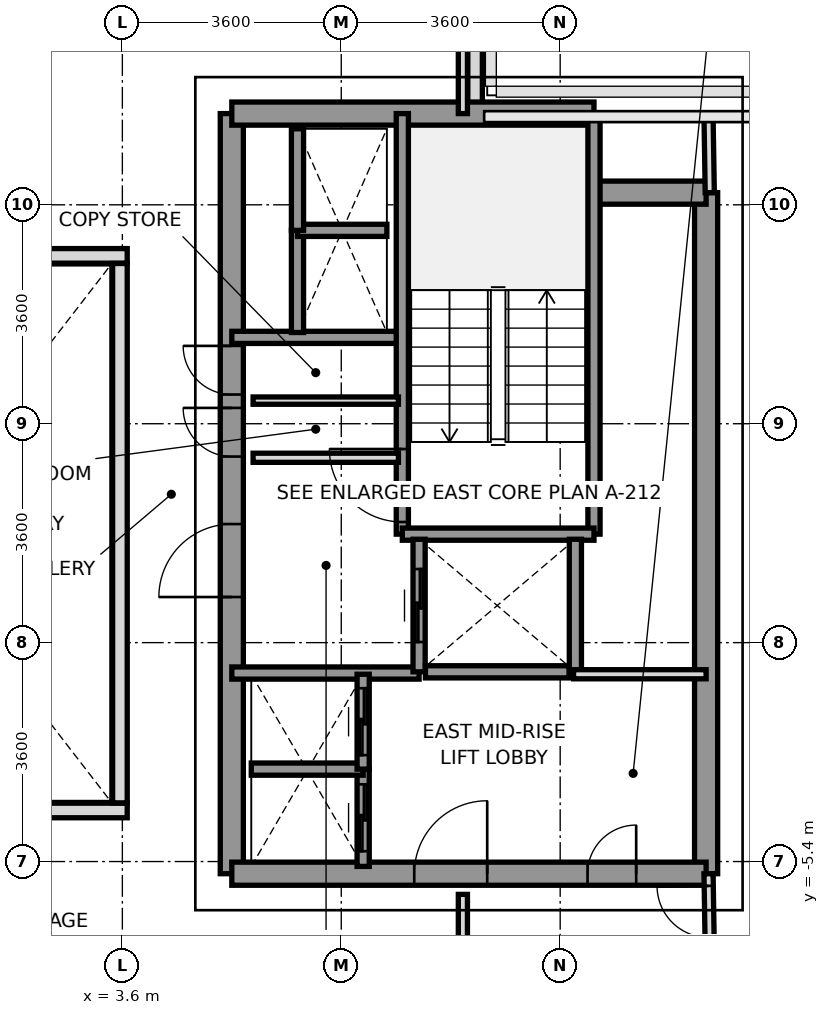
"""IFC4 building model, lengths in metres.
Left out: names, types, materials, properties, quantities, classifications, styles, units other than length and angle.
Written with IfcOpenShell. Run it as: python <this file> out.ifc"""

import sys

from ifc_helpers import new_model, si_unit, direction, frame, frame_2d, origin, place, context, subcontext, project, spatial, rectangle, extrude, source, transform, mapped, element, fill, save


model = new_model("IFC4")
c1 = context("Model", 3, precision=1e-05, world=origin(), true_north=direction((0.0, 1.0)))
c2 = subcontext(c1, "Body", "Model", "MODEL_VIEW")
j1 = project(units=[si_unit("LENGTHUNIT", "METRE"), si_unit("PLANEANGLEUNIT", "RADIAN")], contexts=[c1])
p1 = place(None, origin())
s1 = spatial("IfcSite", under=j1, at=p1, CompositionType="ELEMENT")
p2 = place(p1, origin())
s2 = spatial("IfcBuilding", under=s1, at=p2, CompositionType="ELEMENT")
p3 = place(p2, frame((0.0, 0.0, 163.8)))
s3 = spatial("IfcBuildingStorey", under=s2, at=p3, CompositionType="ELEMENT", Elevation=163.8)
p4 = place(p3, frame((9.4, 8.547, 0.0), z_axis=(0.0, 0.0, 1.0), x_axis=(0.0, -1.0, 0.0)))
e1 = element("IfcWall", 1, at=p4, inside=s3, PredefinedType="PARAPET", context=c2, shape_type="SweptSolid", body=[
    extrude(rectangle(XDim=1.594, YDim=0.24, at=frame_2d((0.797, 0.0))), origin(), (0.0, 0.0, 1.0), 1.15),
])
p5 = place(p3, frame((13.2, -5.6, 0.0), z_axis=(0.0, 0.0, 1.0), x_axis=(0.0, 1.0, 0.0)))
e2 = element("IfcWall", 2, at=p5, inside=s3, PredefinedType="SHEAR", context=c2, shape_type="SweptSolid", body=[
    extrude(rectangle(XDim=11.2, YDim=0.38, at=frame_2d((5.6, 0.0))), origin(), (0.0, 0.0, 1.0), 3.2),
])
p6 = place(p3, frame((5.4, -5.6, 0.0), z_axis=(0.0, 0.0, 1.0), x_axis=(0.0, 1.0, 0.0)))
e3 = element("IfcWall", 3, at=p6, inside=s3, PredefinedType="SHEAR", context=c2, shape_type="SweptSolid", body=[
    extrude(rectangle(XDim=12.5, YDim=0.38, at=frame_2d((6.25, 0.0))), origin(), (0.0, 0.0, 1.0), 3.2),
])
p7 = place(p6, frame((4.55, 0.0, 0.0)))
e4 = element("IfcOpeningElement", 4, at=p7, cuts=e3, PredefinedType="OPENING", context=c2, shape_type="SweptSolid", body=[
    extrude(rectangle(XDim=1.2, YDim=2.2, at=frame_2d((0.6, 1.1))), frame((0.0, 0.2, 0.0), z_axis=(0.0, -1.0, 0.0), x_axis=(1.0, 0.0, 0.0)), (0.0, 0.0, 1.0), 0.4),
])
p8 = place(p6, frame((6.86, 0.0, 0.0)))
e5 = element("IfcOpeningElement", 5, at=p8, cuts=e3, PredefinedType="OPENING", context=c2, shape_type="SweptSolid", body=[
    extrude(rectangle(XDim=0.8, YDim=2.1, at=frame_2d((0.4, 1.05))), frame((0.0, 0.2, 0.0), z_axis=(0.0, -1.0, 0.0), x_axis=(1.0, 0.0, 0.0)), (0.0, 0.0, 1.0), 0.4),
])
p9 = place(p6, frame((7.88, 0.0, 0.0)))
e6 = element("IfcOpeningElement", 6, at=p9, cuts=e3, PredefinedType="OPENING", context=c2, shape_type="SweptSolid", body=[
    extrude(rectangle(XDim=0.8, YDim=2.1, at=frame_2d((0.4, 1.05))), frame((0.0, 0.2, 0.0), z_axis=(0.0, -1.0, 0.0), x_axis=(1.0, 0.0, 0.0)), (0.0, 0.0, 1.0), 0.4),
])
p10 = place(p3, frame((5.4, 6.9, 0.0), z_axis=(0.0, 0.0, 1.0), x_axis=(1.0, 0.0, 0.0)))
e7 = element("IfcWall", 7, at=p10, inside=s3, PredefinedType="SHEAR", context=c2, shape_type="SweptSolid", body=[
    extrude(rectangle(XDim=5.956, YDim=0.38, at=frame_2d((2.978, 0.0))), origin(), (0.0, 0.0, 1.0), 3.2),
])
p11 = place(p3, frame((11.356, 5.6, 0.0), z_axis=(0.0, 0.0, 1.0), x_axis=(1.0, 0.0, 0.0)))
e8 = element("IfcWall", 8, at=p11, inside=s3, PredefinedType="SHEAR", context=c2, shape_type="SweptSolid", body=[
    extrude(rectangle(XDim=1.844, YDim=0.38, at=frame_2d((0.922, 0.0))), origin(), (0.0, 0.0, 1.0), 3.2),
])
p12 = place(p3, frame((5.4, -5.6, 0.0), z_axis=(0.0, 0.0, 1.0), x_axis=(1.0, 0.0, 0.0)))
e9 = element("IfcWall", 9, at=p12, inside=s3, PredefinedType="SHEAR", context=c2, shape_type="SweptSolid", body=[
    extrude(rectangle(XDim=7.8, YDim=0.38, at=frame_2d((3.9, 0.0))), origin(), (0.0, 0.0, 1.0), 3.2),
])
p13 = place(p12, frame((3.0, 0.0, 0.0)))
e10 = element("IfcOpeningElement", 10, at=p13, cuts=e9, PredefinedType="OPENING", context=c2, shape_type="SweptSolid", body=[
    extrude(rectangle(XDim=1.2, YDim=2.2, at=frame_2d((0.6, 1.1))), frame((0.0, 0.2, 0.0), z_axis=(0.0, -1.0, 0.0), x_axis=(1.0, 0.0, 0.0)), (0.0, 0.0, 1.0), 0.4),
])
p14 = place(p12, frame((5.85, 0.0, 0.0)))
e11 = element("IfcOpeningElement", 11, at=p14, cuts=e9, PredefinedType="OPENING", context=c2, shape_type="SweptSolid", body=[
    extrude(rectangle(XDim=0.8, YDim=2.1, at=frame_2d((0.4, 1.05))), frame((0.0, 0.2, 0.0), z_axis=(0.0, -1.0, 0.0), x_axis=(1.0, 0.0, 0.0)), (0.0, 0.0, 1.0), 0.4),
])
p15 = place(p3, frame((5.4, 3.22, 0.0), z_axis=(0.0, 0.0, 1.0), x_axis=(1.0, 0.0, 0.0)))
e12 = element("IfcWall", 12, at=p15, inside=s3, PredefinedType="SOLIDWALL", context=c2, shape_type="SweptSolid", body=[
    extrude(rectangle(XDim=2.78, YDim=0.2, at=frame_2d((1.39, 0.0))), origin(), (0.0, 0.0, 1.0), 3.2),
])
p16 = place(p3, frame((5.4, -2.3, 0.0), z_axis=(0.0, 0.0, 1.0), x_axis=(1.0, 0.0, 0.0)))
e13 = element("IfcWall", 13, at=p16, inside=s3, PredefinedType="SOLIDWALL", context=c2, shape_type="SweptSolid", body=[
    extrude(rectangle(XDim=3.08, YDim=0.2, at=frame_2d((1.54, 0.0))), origin(), (0.0, 0.0, 1.0), 3.2),
])
p17 = place(p3, frame((8.204, -0.016, 0.0), z_axis=(0.0, 0.0, 1.0), x_axis=(0.0, 1.0, 0.0)))
e14 = element("IfcWall", 14, at=p17, inside=s3, PredefinedType="SOLIDWALL", context=c2, shape_type="SweptSolid", body=[
    extrude(rectangle(XDim=6.916, YDim=0.2, at=frame_2d((3.458, 0.0))), origin(), (0.0, 0.0, 1.0), 3.2),
])
p18 = place(p17, frame((0.2, 0.0, 0.0)))
e15 = element("IfcOpeningElement", 15, at=p18, cuts=e14, PredefinedType="OPENING", context=c2, shape_type="SweptSolid", body=[
    extrude(rectangle(XDim=1.2, YDim=2.2, at=frame_2d((0.6, 1.1))), frame((0.0, 0.11, 0.0), z_axis=(0.0, -1.0, 0.0), x_axis=(1.0, 0.0, 0.0)), (0.0, 0.0, 1.0), 0.22),
])
p19 = place(p3, frame((11.356, -0.016, 0.0), z_axis=(0.0, 0.0, 1.0), x_axis=(0.0, 1.0, 0.0)))
e16 = element("IfcWall", 16, at=p19, inside=s3, PredefinedType="SOLIDWALL", context=c2, shape_type="SweptSolid", body=[
    extrude(rectangle(XDim=6.916, YDim=0.2, at=frame_2d((3.458, 0.0))), origin(), (0.0, 0.0, 1.0), 3.2),
])
p20 = place(p3, frame((8.204, -0.016, 0.0), z_axis=(0.0, 0.0, 1.0), x_axis=(1.0, 0.0, 0.0)))
e17 = element("IfcWall", 17, at=p20, inside=s3, PredefinedType="SOLIDWALL", context=c2, shape_type="SweptSolid", body=[
    extrude(rectangle(XDim=3.152, YDim=0.2, at=frame_2d((1.576, 0.0))), origin(), (0.0, 0.0, 1.0), 3.2),
])
p21 = place(p3, frame((8.48, -2.28, 0.0), z_axis=(0.0, 0.0, 1.0), x_axis=(0.0, 1.0, 0.0)))
e18 = element("IfcWall", 18, at=p21, inside=s3, PredefinedType="SOLIDWALL", context=c2, shape_type="SweptSolid", body=[
    extrude(rectangle(XDim=2.18, YDim=0.2, at=frame_2d((1.09, 0.0))), origin(), (0.0, 0.0, 1.0), 3.2),
])
p22 = place(p21, frame((0.49, 0.0, 0.0)))
e19 = element("IfcOpeningElement", 19, at=p22, cuts=e18, PredefinedType="OPENING", context=c2, shape_type="SweptSolid", body=[
    extrude(rectangle(XDim=1.2, YDim=2.2, at=frame_2d((0.6, 1.1))), frame((0.0, 0.11, 0.0), z_axis=(0.0, -1.0, 0.0), x_axis=(1.0, 0.0, 0.0)), (0.0, 0.0, 1.0), 0.22),
])
p23 = place(p3, frame((11.05, -2.28, 0.0), z_axis=(0.0, 0.0, 1.0), x_axis=(0.0, 1.0, 0.0)))
e20 = element("IfcWall", 20, at=p23, inside=s3, PredefinedType="SOLIDWALL", context=c2, shape_type="SweptSolid", body=[
    extrude(rectangle(XDim=2.18, YDim=0.2, at=frame_2d((1.09, 0.0))), origin(), (0.0, 0.0, 1.0), 3.2),
])
p24 = place(p3, frame((8.584, -2.28, 0.0), z_axis=(0.0, 0.0, 1.0), x_axis=(1.0, 0.0, 0.0)))
e21 = element("IfcWall", 21, at=p24, inside=s3, PredefinedType="SOLIDWALL", context=c2, shape_type="SweptSolid", body=[
    extrude(rectangle(XDim=2.362, YDim=0.2, at=frame_2d((1.181, 0.0))), origin(), (0.0, 0.0, 1.0), 3.2),
])
p25 = place(p3, frame((7.56, -5.48, 0.0), z_axis=(0.0, 0.0, 1.0), x_axis=(0.0, 1.0, 0.0)))
e22 = element("IfcWall", 22, at=p25, inside=s3, PredefinedType="SOLIDWALL", context=c2, shape_type="SweptSolid", body=[
    extrude(rectangle(XDim=1.6, YDim=0.2, at=frame_2d((0.8, 0.0))), origin(), (0.0, 0.0, 1.0), 3.2),
])
p26 = place(p25, frame((0.25, 0.0, 0.0)))
e23 = element("IfcOpeningElement", 23, at=p26, cuts=e22, PredefinedType="OPENING", context=c2, shape_type="SweptSolid", body=[
    extrude(rectangle(XDim=1.1, YDim=2.2, at=frame_2d((0.55, 1.1))), frame((0.0, 0.11, 0.0), z_axis=(0.0, -1.0, 0.0), x_axis=(1.0, 0.0, 0.0)), (0.0, 0.0, 1.0), 0.22),
])
p27 = place(p3, frame((5.72, -3.88, 0.0), z_axis=(0.0, 0.0, 1.0), x_axis=(1.0, 0.0, 0.0)))
e24 = element("IfcWall", 24, at=p27, inside=s3, PredefinedType="SOLIDWALL", context=c2, shape_type="SweptSolid", body=[
    extrude(rectangle(XDim=1.84, YDim=0.2, at=frame_2d((0.92, 0.0))), origin(), (0.0, 0.0, 1.0), 3.2),
])
p28 = place(p3, frame((7.56, -3.88, 0.0), z_axis=(0.0, 0.0, 1.0), x_axis=(0.0, 1.0, 0.0)))
e25 = element("IfcWall", 25, at=p28, inside=s3, PredefinedType="SOLIDWALL", context=c2, shape_type="SweptSolid", body=[
    extrude(rectangle(XDim=1.56, YDim=0.2, at=frame_2d((0.78, 0.0))), origin(), (0.0, 0.0, 1.0), 3.2),
])
p29 = place(p28, frame((0.23, 0.0, 0.0)))
e26 = element("IfcOpeningElement", 26, at=p29, cuts=e25, PredefinedType="OPENING", context=c2, shape_type="SweptSolid", body=[
    extrude(rectangle(XDim=1.1, YDim=2.2, at=frame_2d((0.55, 1.1))), frame((0.0, 0.11, 0.0), z_axis=(0.0, -1.0, 0.0), x_axis=(1.0, 0.0, 0.0)), (0.0, 0.0, 1.0), 0.22),
])
p30 = place(p3, frame((6.48, 3.3, 0.0), z_axis=(0.0, 0.0, 1.0), x_axis=(0.0, 1.0, 0.0)))
e27 = element("IfcWall", 27, at=p30, inside=s3, PredefinedType="SOLIDWALL", context=c2, shape_type="SweptSolid", body=[
    extrude(rectangle(XDim=1.68, YDim=0.2, at=frame_2d((0.84, 0.0))), origin(), (0.0, 0.0, 1.0), 3.2),
])
p31 = place(p3, frame((6.48, 4.98, 0.0), z_axis=(0.0, 0.0, 1.0), x_axis=(1.0, 0.0, 0.0)))
e28 = element("IfcWall", 28, at=p31, inside=s3, PredefinedType="SOLIDWALL", context=c2, shape_type="SweptSolid", body=[
    extrude(rectangle(XDim=1.47, YDim=0.2, at=frame_2d((0.735, 0.0))), origin(), (0.0, 0.0, 1.0), 3.2),
])
p32 = place(p3, frame((6.48, 4.98, 0.0), z_axis=(0.0, 0.0, 1.0), x_axis=(0.0, 1.0, 0.0)))
e29 = element("IfcWall", 29, at=p32, inside=s3, PredefinedType="SOLIDWALL", context=c2, shape_type="SweptSolid", body=[
    extrude(rectangle(XDim=1.67, YDim=0.2, at=frame_2d((0.835, 0.0))), origin(), (0.0, 0.0, 1.0), 3.2),
])
p33 = place(p3, frame((5.75, 1.24, 0.0), z_axis=(0.0, 0.0, 1.0), x_axis=(1.0, 0.0, 0.0)))
e30 = element("IfcWall", 30, at=p33, inside=s3, PredefinedType="PARTITIONING", context=c2, shape_type="SweptSolid", body=[
    extrude(rectangle(XDim=2.39, YDim=0.15, at=frame_2d((1.195, 0.0))), origin(), (0.0, 0.0, 1.0), 2.3),
])
p34 = place(p3, frame((5.75, 2.18, 0.0), z_axis=(0.0, 0.0, 1.0), x_axis=(1.0, 0.0, 0.0)))
e31 = element("IfcWall", 31, at=p34, inside=s3, PredefinedType="PARTITIONING", context=c2, shape_type="SweptSolid", body=[
    extrude(rectangle(XDim=2.39, YDim=0.12, at=frame_2d((1.195, 0.0))), origin(), (0.0, 0.0, 1.0), 2.3),
])
p35 = place(p3, frame((11.02, -2.32, 0.0), z_axis=(0.0, 0.0, 1.0), x_axis=(1.0, 0.0, 0.0)))
e32 = element("IfcWall", 32, at=p35, inside=s3, PredefinedType="PARTITIONING", context=c2, shape_type="SweptSolid", body=[
    extrude(rectangle(XDim=2.18, YDim=0.15, at=frame_2d((1.09, 0.0))), origin(), (0.0, 0.0, 1.0), 3.2),
])
p36 = place(p3, frame((9.2, 6.9, 0.0), z_axis=(0.0, 0.0, 1.0), x_axis=(0.0, 1.0, 0.0)))
e33 = element("IfcWall", 33, at=p36, inside=s3, PredefinedType="PARTITIONING", context=c2, shape_type="SweptSolid", body=[
    extrude(rectangle(XDim=8.78, YDim=0.15, at=frame_2d((4.39, 0.0))), origin(), (0.0, 0.0, 1.0), 2.75),
])
p37 = place(p3, frame((9.2, -15.68, 0.0), z_axis=(0.0, 0.0, 1.0), x_axis=(0.0, 1.0, 0.0)))
e34 = element("IfcWall", 34, at=p37, inside=s3, PredefinedType="PARTITIONING", context=c2, shape_type="SweptSolid", body=[
    extrude(rectangle(XDim=9.74, YDim=0.15, at=frame_2d((4.87, 0.0))), origin(), (0.0, 0.0, 1.0), 2.75),
])
p38 = place(p3, frame((13.26, 5.6, 0.0), z_axis=(0.0, 0.0, 1.0), x_axis=(-0.016013571389, 0.999871774545, 0.0)))
e35 = element("IfcWall", 35, at=p38, inside=s3, PredefinedType="PARTITIONING", context=c2, shape_type="SweptSolid", body=[
    extrude(rectangle(XDim=1.25, YDim=0.15, at=frame_2d((0.625, 0.0))), origin(), (0.0, 0.0, 1.0), 3.2),
])
p39 = place(p3, frame((13.26, -6.85, 0.0), z_axis=(0.0, 0.0, 1.0), x_axis=(-0.016013571389, 0.999871774545, 0.0)))
e36 = element("IfcWall", 36, at=p39, inside=s3, PredefinedType="PARTITIONING", context=c2, shape_type="SweptSolid", body=[
    extrude(rectangle(XDim=1.25, YDim=0.15, at=frame_2d((0.625, 0.0))), origin(), (0.0, 0.0, 1.0), 3.2),
])
p40 = place(p39, frame((0.2, 0.0, 0.0)))
e37 = element("IfcOpeningElement", 37, at=p40, cuts=e36, PredefinedType="OPENING", context=c2, shape_type="SweptSolid", body=[
    extrude(rectangle(XDim=0.85, YDim=2.1, at=frame_2d((0.425, 1.05))), frame((0.0, 0.085, 0.0), z_axis=(0.0, -1.0, 0.0), x_axis=(1.0, 0.0, 0.0)), (0.0, 0.0, 1.0), 0.17),
])
for number, where, z_axis, x_axis in (
    (38, (-3.68, -4.56, 0.0), (0.0, 0.0, 1.0), (1.0, 0.0, 0.0)),
    (39, (-3.68, 4.56, 0.0), (0.0, 0.0, 1.0), (1.0, 0.0, 0.0)),
):
    element("IfcWall", number, at=place(p3, frame(where, z_axis=z_axis, x_axis=x_axis)), inside=s3, PredefinedType="PARAPET", context=c2, shape_type="SweptSolid", body=[
        extrude(rectangle(XDim=7.36, YDim=0.24, at=frame_2d((3.68, 0.0))), origin(), (0.0, 0.0, 1.0), 1.15),
    ])
p41 = place(p3, frame((3.56, -4.435, 0.0), z_axis=(0.0, 0.0, 1.0), x_axis=(0.0, 1.0, 0.0)))
e40 = element("IfcWall", 40, at=p41, inside=s3, PredefinedType="PARAPET", context=c2, shape_type="SweptSolid", body=[
    extrude(rectangle(XDim=8.87, YDim=0.24, at=frame_2d((4.435, 0.0))), origin(), (0.0, 0.0, 1.0), 1.15),
])
m1 = source(origin(), c2, "Body", "SweptSolid", [
    extrude(rectangle(XDim=1.2, YDim=2.2, at=frame_2d((0.6, 1.1))), frame((0.0, 0.025, 0.0), z_axis=(0.0, -1.0, 0.0), x_axis=(1.0, 0.0, 0.0)), (0.0, 0.0, 1.0), 0.05),
])
p42 = place(p18, origin())
e41 = element("IfcDoor", 41, at=p42, inside=s3, OperationType="SINGLE_SWING_RIGHT", PredefinedType="DOOR", context=c2, shape_type="MappedRepresentation", body=[
    mapped(m1, transform((0.0, 0.0, 0.0), x_axis=(1.0, 0.0, 0.0), y_axis=(0.0, 1.0, 0.0), z_axis=(0.0, 0.0, 1.0), scale=1.0)),
])
fill(e15, e41)
p43 = place(p7, origin())
e42 = element("IfcDoor", 42, at=p43, inside=s3, OperationType="SINGLE_SWING_LEFT", PredefinedType="DOOR", context=c2, shape_type="MappedRepresentation", body=[
    mapped(m1, transform((0.0, 0.0, 0.0), x_axis=(1.0, 0.0, 0.0), y_axis=(0.0, 1.0, 0.0), z_axis=(0.0, 0.0, 1.0), scale=1.0)),
])
fill(e4, e42)
p44 = place(p13, origin())
e43 = element("IfcDoor", 43, at=p44, inside=s3, OperationType="SINGLE_SWING_RIGHT", PredefinedType="DOOR", context=c2, shape_type="MappedRepresentation", body=[
    mapped(m1, transform((0.0, 0.0, 0.0), x_axis=(1.0, 0.0, 0.0), y_axis=(0.0, 1.0, 0.0), z_axis=(0.0, 0.0, 1.0), scale=1.0)),
])
fill(e10, e43)
m2 = source(origin(), c2, "Body", "SweptSolid", [
    extrude(rectangle(XDim=0.8, YDim=2.1, at=frame_2d((0.4, 1.05))), frame((0.0, 0.025, 0.0), z_axis=(0.0, -1.0, 0.0), x_axis=(1.0, 0.0, 0.0)), (0.0, 0.0, 1.0), 0.05),
])
p45 = place(p8, origin())
e44 = element("IfcDoor", 44, at=p45, inside=s3, OperationType="SINGLE_SWING_RIGHT", PredefinedType="DOOR", context=c2, shape_type="MappedRepresentation", body=[
    mapped(m2, transform((0.0, 0.0, 0.0), x_axis=(1.0, 0.0, 0.0), y_axis=(0.0, 1.0, 0.0), z_axis=(0.0, 0.0, 1.0), scale=1.0)),
])
fill(e5, e44)
p46 = place(p9, origin())
e45 = element("IfcDoor", 45, at=p46, inside=s3, OperationType="SINGLE_SWING_RIGHT", PredefinedType="DOOR", context=c2, shape_type="MappedRepresentation", body=[
    mapped(m2, transform((0.0, 0.0, 0.0), x_axis=(1.0, 0.0, 0.0), y_axis=(0.0, 1.0, 0.0), z_axis=(0.0, 0.0, 1.0), scale=1.0)),
])
fill(e6, e45)
p47 = place(p14, origin())
e46 = element("IfcDoor", 46, at=p47, inside=s3, OperationType="SINGLE_SWING_RIGHT", PredefinedType="DOOR", context=c2, shape_type="MappedRepresentation", body=[
    mapped(m2, transform((0.0, 0.0, 0.0), x_axis=(1.0, 0.0, 0.0), y_axis=(0.0, 1.0, 0.0), z_axis=(0.0, 0.0, 1.0), scale=1.0)),
])
fill(e11, e46)
p48 = place(p22, origin())
e47 = element("IfcDoor", 47, at=p48, inside=s3, OperationType="SLIDING_TO_RIGHT", PredefinedType="DOOR", context=c2, shape_type="MappedRepresentation", body=[
    mapped(m1, transform((0.0, 0.0, 0.0), x_axis=(1.0, 0.0, 0.0), y_axis=(0.0, 1.0, 0.0), z_axis=(0.0, 0.0, 1.0), scale=1.0)),
])
fill(e19, e47)
m3 = source(origin(), c2, "Body", "SweptSolid", [
    extrude(rectangle(XDim=1.1, YDim=2.2, at=frame_2d((0.55, 1.1))), frame((0.0, 0.025, 0.0), z_axis=(0.0, -1.0, 0.0), x_axis=(1.0, 0.0, 0.0)), (0.0, 0.0, 1.0), 0.05),
])
p49 = place(p26, origin())
e48 = element("IfcDoor", 48, at=p49, inside=s3, OperationType="SLIDING_TO_LEFT", PredefinedType="DOOR", context=c2, shape_type="MappedRepresentation", body=[
    mapped(m3, transform((0.0, 0.0, 0.0), x_axis=(1.0, 0.0, 0.0), y_axis=(0.0, 1.0, 0.0), z_axis=(0.0, 0.0, 1.0), scale=1.0)),
])
fill(e23, e48)
p50 = place(p29, origin())
e49 = element("IfcDoor", 49, at=p50, inside=s3, OperationType="SLIDING_TO_LEFT", PredefinedType="DOOR", context=c2, shape_type="MappedRepresentation", body=[
    mapped(m3, transform((0.0, 0.0, 0.0), x_axis=(1.0, 0.0, 0.0), y_axis=(0.0, 1.0, 0.0), z_axis=(0.0, 0.0, 1.0), scale=1.0)),
])
fill(e26, e49)
m4 = source(origin(), c2, "Body", "SweptSolid", [
    extrude(rectangle(XDim=0.85, YDim=2.1, at=frame_2d((0.425, 1.05))), frame((0.0, 0.025, 0.0), z_axis=(0.0, -1.0, 0.0), x_axis=(1.0, 0.0, 0.0)), (0.0, 0.0, 1.0), 0.05),
])
p51 = place(p40, origin())
e50 = element("IfcDoor", 50, at=p51, inside=s3, OperationType="SINGLE_SWING_RIGHT", PredefinedType="DOOR", context=c2, shape_type="MappedRepresentation", body=[
    mapped(m4, transform((0.0, 0.0, 0.0), x_axis=(1.0, 0.0, 0.0), y_axis=(0.0, 1.0, 0.0), z_axis=(0.0, 0.0, 1.0), scale=1.0)),
])
fill(e37, e50)
save(model, sys.argv[1])
